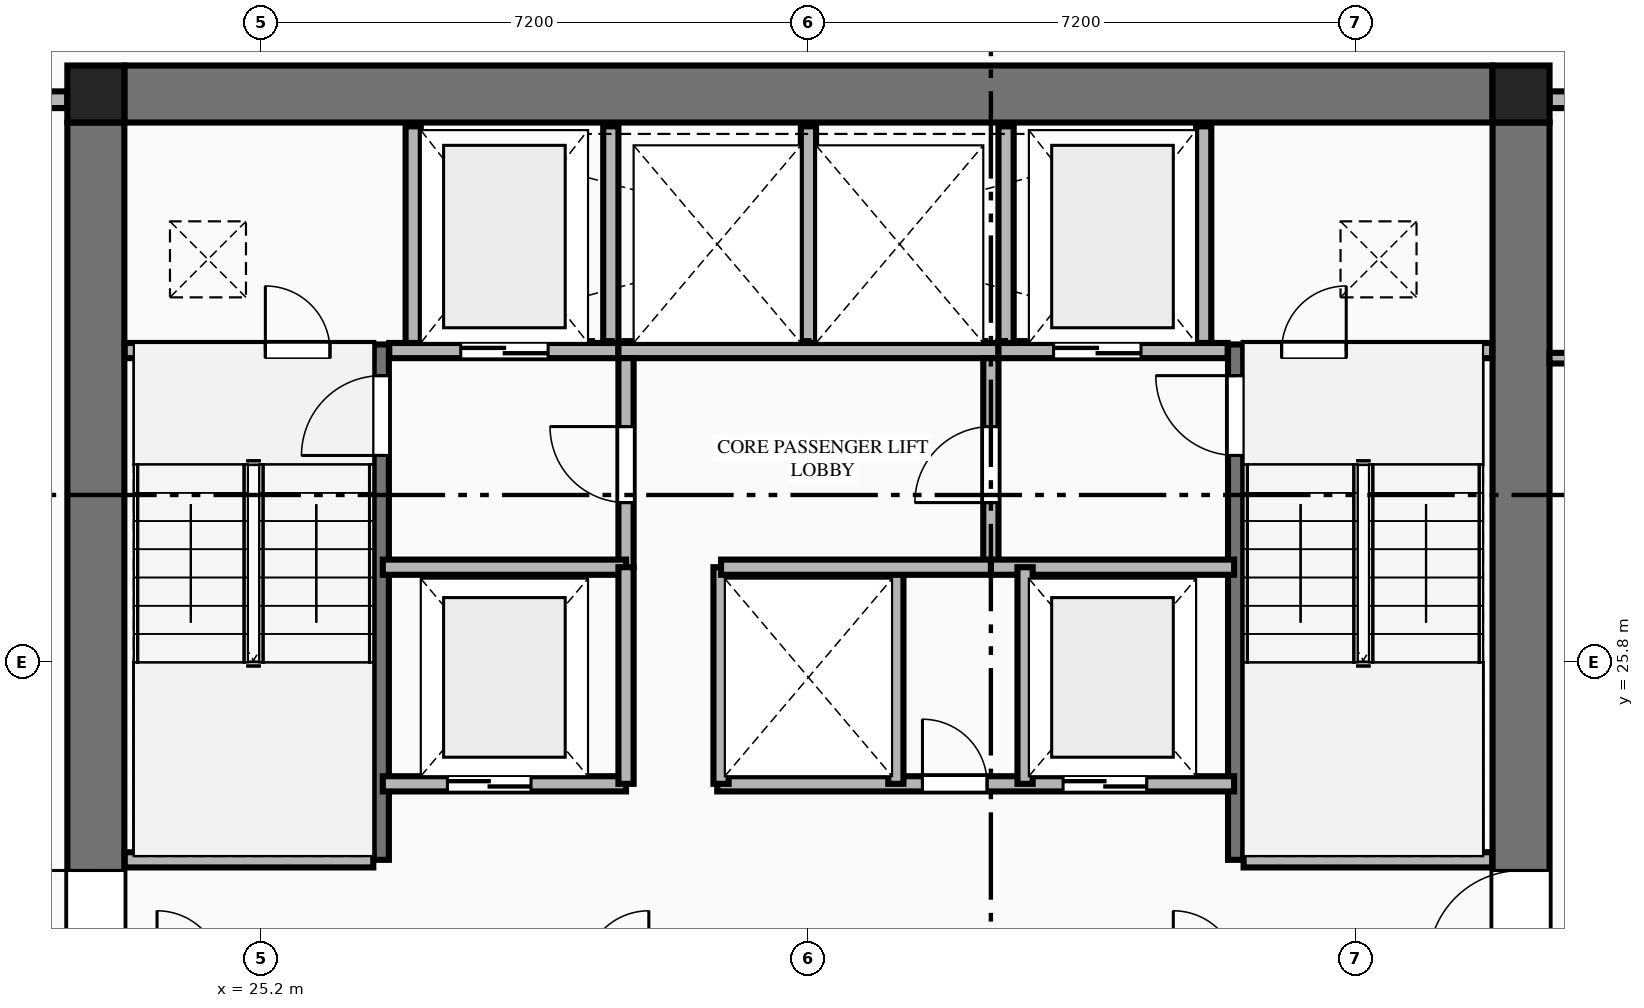
"""IFC4 building model, lengths in metres.
Left out: names, types, materials, properties, quantities, classifications, styles, units other than length and angle.
Written with IfcOpenShell. Run it as: python <this file> out.ifc"""

import sys

from ifc_helpers import new_model, si_unit, direction, frame, frame_2d, origin, origin_2d, place, context, subcontext, project, spatial, rectangle, extrude, element, fill, save


model = new_model("IFC4")
c1 = context("Model", 3, precision=1e-05, world=origin(), true_north=direction((0.0, 1.0)))
c2 = subcontext(c1, "Body", "Model", "MODEL_VIEW")
j1 = project(units=[si_unit("LENGTHUNIT", "METRE"), si_unit("PLANEANGLEUNIT", "RADIAN")], contexts=[c1])
p1 = place(None, origin())
s1 = spatial("IfcSite", under=j1, at=p1, CompositionType="ELEMENT")
p2 = place(p1, origin())
s2 = spatial("IfcBuilding", under=s1, at=p2, CompositionType="ELEMENT")
p3 = place(p2, frame((0.0, 0.0, 148.1)))
s3 = spatial("IfcBuildingStorey", under=s2, at=p3, CompositionType="ELEMENT", Elevation=148.1)
for number, where, z_axis, x_axis in (
    (1, (41.775, 33.275, 0.0), (0.0, 0.0, 1.0), (1.0, 0.0, 0.0)),
    (2, (23.025, 33.275, 0.0), (0.0, 0.0, 1.0), (1.0, 0.0, 0.0)),
):
    element("IfcColumn", number, at=place(p3, frame(where, z_axis=z_axis, x_axis=x_axis)), inside=s3, PredefinedType="COLUMN", context=c2, shape_type="SweptSolid", body=[
        extrude(rectangle(XDim=0.75, YDim=0.75, at=origin_2d()), origin(), (0.0, 0.0, 1.0), 5.4),
    ])
p4 = place(p3, frame((23.4, 33.275, 0.0), z_axis=(0.0, 0.0, 1.0), x_axis=(1.0, 0.0, 0.0)))
e3 = element("IfcWall", 3, at=p4, inside=s3, PredefinedType="SHEAR", context=c2, shape_type="SweptSolid", body=[
    extrude(rectangle(XDim=18.0, YDim=0.75, at=frame_2d((9.0, 0.0))), origin(), (0.0, 0.0, 1.0), 5.19),
])
p5 = place(p3, frame((23.025, 18.9, 0.0), z_axis=(0.0, 0.0, 1.0), x_axis=(0.0, 1.0, 0.0)))
e4 = element("IfcWall", 4, at=p5, inside=s3, PredefinedType="SHEAR", context=c2, shape_type="SweptSolid", body=[
    extrude(rectangle(XDim=14.0, YDim=0.75, at=frame_2d((7.0, 0.0))), origin(), (0.0, 0.0, 1.0), 5.19),
])
p6 = place(p5, frame((2.94, 0.0, 0.0)))
e5 = element("IfcOpeningElement", 5, at=p6, cuts=e4, PredefinedType="OPENING", context=c2, shape_type="SweptSolid", body=[
    extrude(rectangle(XDim=1.22, YDim=2.25, at=frame_2d((0.61, 1.125))), frame((0.0, 0.385, 0.0), z_axis=(0.0, -1.0, 0.0), x_axis=(1.0, 0.0, 0.0)), (0.0, 0.0, 1.0), 0.77),
])
p7 = place(p3, frame((41.775, 18.9, 0.0), z_axis=(0.0, 0.0, 1.0), x_axis=(0.0, 1.0, 0.0)))
e6 = element("IfcWall", 6, at=p7, inside=s3, PredefinedType="SHEAR", context=c2, shape_type="SweptSolid", body=[
    extrude(rectangle(XDim=14.0, YDim=0.75, at=frame_2d((7.0, 0.0))), origin(), (0.0, 0.0, 1.0), 5.19),
])
p8 = place(p7, frame((2.94, 0.0, 0.0)))
e7 = element("IfcOpeningElement", 7, at=p8, cuts=e6, PredefinedType="OPENING", context=c2, shape_type="SweptSolid", body=[
    extrude(rectangle(XDim=1.22, YDim=2.25, at=frame_2d((0.61, 1.125))), frame((0.0, 0.385, 0.0), z_axis=(0.0, -1.0, 0.0), x_axis=(1.0, 0.0, 0.0)), (0.0, 0.0, 1.0), 0.77),
])
p9 = place(p3, frame((26.78, 23.2, 0.0), z_axis=(0.0, 0.0, 1.0), x_axis=(0.0, 1.0, 0.0)))
e8 = element("IfcWall", 8, at=p9, inside=s3, PredefinedType="SHEAR", context=c2, shape_type="SweptSolid", body=[
    extrude(rectangle(XDim=6.78, YDim=0.2, at=frame_2d((3.39, 0.0))), origin(), (0.0, 0.0, 1.0), 5.4),
])
p10 = place(p9, frame((5.32, 0.0, 0.0)))
e9 = element("IfcOpeningElement", 9, at=p10, cuts=e8, PredefinedType="OPENING", context=c2, shape_type="SweptSolid", body=[
    extrude(rectangle(XDim=1.05, YDim=2.15, at=frame_2d((0.525, 1.075))), frame((0.0, 0.11, 0.0), z_axis=(0.0, -1.0, 0.0), x_axis=(1.0, 0.0, 0.0)), (0.0, 0.0, 1.0), 0.22),
])
p11 = place(p3, frame((23.405, 23.2, 0.0), z_axis=(0.0, 0.0, 1.0), x_axis=(1.0, 0.0, 0.0)))
e10 = element("IfcWall", 10, at=p11, inside=s3, PredefinedType="PLUMBINGWALL", context=c2, shape_type="SweptSolid", body=[
    extrude(rectangle(XDim=3.27, YDim=0.2, at=frame_2d((1.635, 0.0))), origin(), (0.0, 0.0, 1.0), 5.19),
])
p12 = place(p3, frame((38.02, 23.2, 0.0), z_axis=(0.0, 0.0, 1.0), x_axis=(0.0, 1.0, 0.0)))
e11 = element("IfcWall", 11, at=p12, inside=s3, PredefinedType="SHEAR", context=c2, shape_type="SweptSolid", body=[
    extrude(rectangle(XDim=6.78, YDim=0.2, at=frame_2d((3.39, 0.0))), origin(), (0.0, 0.0, 1.0), 5.4),
])
p13 = place(p12, frame((5.32, 0.0, 0.0)))
e12 = element("IfcOpeningElement", 12, at=p13, cuts=e11, PredefinedType="OPENING", context=c2, shape_type="SweptSolid", body=[
    extrude(rectangle(XDim=1.05, YDim=2.15, at=frame_2d((0.525, 1.075))), frame((0.0, 0.11, 0.0), z_axis=(0.0, -1.0, 0.0), x_axis=(1.0, 0.0, 0.0)), (0.0, 0.0, 1.0), 0.22),
])
p14 = place(p3, frame((38.125, 23.2, 0.0), z_axis=(0.0, 0.0, 1.0), x_axis=(1.0, 0.0, 0.0)))
e13 = element("IfcWall", 13, at=p14, inside=s3, PredefinedType="PLUMBINGWALL", context=c2, shape_type="SweptSolid", body=[
    extrude(rectangle(XDim=3.27, YDim=0.2, at=frame_2d((1.635, 0.0))), origin(), (0.0, 0.0, 1.0), 5.19),
])
p15 = place(p3, frame((23.405, 29.9, 0.0), z_axis=(0.0, 0.0, 1.0), x_axis=(1.0, 0.0, 0.0)))
e14 = element("IfcWall", 14, at=p15, inside=s3, PredefinedType="PLUMBINGWALL", context=c2, shape_type="SweptSolid", body=[
    extrude(rectangle(XDim=3.27, YDim=0.2, at=frame_2d((1.635, 0.0))), origin(), (0.0, 0.0, 1.0), 5.19),
])
p16 = place(p15, frame((1.85, 0.0, 0.0)))
e15 = element("IfcOpeningElement", 15, at=p16, cuts=e14, PredefinedType="OPENING", context=c2, shape_type="SweptSolid", body=[
    extrude(rectangle(XDim=0.85, YDim=2.05, at=frame_2d((0.425, 1.025))), frame((0.0, 0.11, 0.0), z_axis=(0.0, -1.0, 0.0), x_axis=(1.0, 0.0, 0.0)), (0.0, 0.0, 1.0), 0.22),
])
p17 = place(p3, frame((26.885, 29.9, 0.0), z_axis=(0.0, 0.0, 1.0), x_axis=(1.0, 0.0, 0.0)))
e16 = element("IfcWall", 16, at=p17, inside=s3, PredefinedType="PLUMBINGWALL", context=c2, shape_type="SweptSolid", body=[
    extrude(rectangle(XDim=3.015, YDim=0.2, at=frame_2d((1.507, 0.0))), origin(), (0.0, 0.0, 1.0), 5.19),
])
p18 = place(p17, frame((0.94, 0.0, 0.0)))
e17 = element("IfcOpeningElement", 17, at=p18, cuts=e16, PredefinedType="OPENING", context=c2, shape_type="SweptSolid", body=[
    extrude(rectangle(XDim=1.15, YDim=2.2, at=frame_2d((0.575, 1.1))), frame((0.0, 0.11, 0.0), z_axis=(0.0, -1.0, 0.0), x_axis=(1.0, 0.0, 0.0)), (0.0, 0.0, 1.0), 0.22),
])
p19 = place(p3, frame((29.9, 29.9, 0.0), z_axis=(0.0, 0.0, 1.0), x_axis=(1.0, 0.0, 0.0)))
e18 = element("IfcWall", 18, at=p19, inside=s3, PredefinedType="PLUMBINGWALL", context=c2, shape_type="SweptSolid", body=[
    extrude(rectangle(XDim=5.0, YDim=0.2, at=frame_2d((2.5, 0.0))), origin(), (0.0, 0.0, 1.0), 5.19),
])
p20 = place(p3, frame((34.9, 29.9, 0.0), z_axis=(0.0, 0.0, 1.0), x_axis=(1.0, 0.0, 0.0)))
e19 = element("IfcWall", 19, at=p20, inside=s3, PredefinedType="PLUMBINGWALL", context=c2, shape_type="SweptSolid", body=[
    extrude(rectangle(XDim=3.015, YDim=0.2, at=frame_2d((1.508, 0.0))), origin(), (0.0, 0.0, 1.0), 5.19),
])
p21 = place(p20, frame((0.725, 0.0, 0.0)))
e20 = element("IfcOpeningElement", 20, at=p21, cuts=e19, PredefinedType="OPENING", context=c2, shape_type="SweptSolid", body=[
    extrude(rectangle(XDim=1.15, YDim=2.2, at=frame_2d((0.575, 1.1))), frame((0.0, 0.11, 0.0), z_axis=(0.0, -1.0, 0.0), x_axis=(1.0, 0.0, 0.0)), (0.0, 0.0, 1.0), 0.22),
])
p22 = place(p3, frame((38.125, 29.9, 0.0), z_axis=(0.0, 0.0, 1.0), x_axis=(1.0, 0.0, 0.0)))
e21 = element("IfcWall", 21, at=p22, inside=s3, PredefinedType="PLUMBINGWALL", context=c2, shape_type="SweptSolid", body=[
    extrude(rectangle(XDim=3.27, YDim=0.2, at=frame_2d((1.635, 0.0))), origin(), (0.0, 0.0, 1.0), 5.19),
])
p23 = place(p22, frame((0.5, 0.0, 0.0)))
e22 = element("IfcOpeningElement", 22, at=p23, cuts=e21, PredefinedType="OPENING", context=c2, shape_type="SweptSolid", body=[
    extrude(rectangle(XDim=0.85, YDim=2.05, at=frame_2d((0.425, 1.025))), frame((0.0, 0.11, 0.0), z_axis=(0.0, -1.0, 0.0), x_axis=(1.0, 0.0, 0.0)), (0.0, 0.0, 1.0), 0.22),
])
for number, where, z_axis, x_axis in (
    (23, (27.2, 30.0, 0.0), (0.0, 0.0, 1.0), (0.0, 1.0, 0.0)),
    (24, (29.8, 30.0, 0.0), (0.0, 0.0, 1.0), (0.0, 1.0, 0.0)),
    (25, (32.4, 30.0, 0.0), (0.0, 0.0, 1.0), (0.0, 1.0, 0.0)),
    (26, (35.0, 30.0, 0.0), (0.0, 0.0, 1.0), (0.0, 1.0, 0.0)),
    (27, (37.6, 30.0, 0.0), (0.0, 0.0, 1.0), (0.0, 1.0, 0.0)),
):
    element("IfcWall", number, at=place(p3, frame(where, z_axis=z_axis, x_axis=x_axis)), inside=s3, PredefinedType="PLUMBINGWALL", context=c2, shape_type="SweptSolid", body=[
        extrude(rectangle(XDim=2.85, YDim=0.2, at=frame_2d((1.425, 0.0))), origin(), (0.0, 0.0, 1.0), 5.19),
    ])
p24 = place(p3, frame((30.0, 27.05, 0.0), z_axis=(0.0, 0.0, 1.0), x_axis=(0.0, 1.0, 0.0)))
e28 = element("IfcWall", 28, at=p24, inside=s3, PredefinedType="PLUMBINGWALL", context=c2, shape_type="SweptSolid", body=[
    extrude(rectangle(XDim=2.75, YDim=0.2, at=frame_2d((1.375, 0.0))), origin(), (0.0, 0.0, 1.0), 5.19),
])
p25 = place(p24, frame((0.85, 0.0, 0.0)))
e29 = element("IfcOpeningElement", 29, at=p25, cuts=e28, PredefinedType="OPENING", context=c2, shape_type="SweptSolid", body=[
    extrude(rectangle(XDim=1.0, YDim=2.15, at=frame_2d((0.5, 1.075))), frame((0.0, 0.11, 0.0), z_axis=(0.0, -1.0, 0.0), x_axis=(1.0, 0.0, 0.0)), (0.0, 0.0, 1.0), 0.22),
])
p26 = place(p3, frame((26.8, 27.05, 0.0), z_axis=(0.0, 0.0, 1.0), x_axis=(1.0, 0.0, 0.0)))
e30 = element("IfcWall", 30, at=p26, inside=s3, PredefinedType="PLUMBINGWALL", context=c2, shape_type="SweptSolid", body=[
    extrude(rectangle(XDim=3.2, YDim=0.2, at=frame_2d((1.6, 0.0))), origin(), (0.0, 0.0, 1.0), 5.19),
])
p27 = place(p3, frame((34.8, 27.05, 0.0), z_axis=(0.0, 0.0, 1.0), x_axis=(0.0, 1.0, 0.0)))
e31 = element("IfcWall", 31, at=p27, inside=s3, PredefinedType="PLUMBINGWALL", context=c2, shape_type="SweptSolid", body=[
    extrude(rectangle(XDim=2.75, YDim=0.2, at=frame_2d((1.375, 0.0))), origin(), (0.0, 0.0, 1.0), 5.19),
])
p28 = place(p27, frame((0.85, 0.0, 0.0)))
e32 = element("IfcOpeningElement", 32, at=p28, cuts=e31, PredefinedType="OPENING", context=c2, shape_type="SweptSolid", body=[
    extrude(rectangle(XDim=1.0, YDim=2.15, at=frame_2d((0.5, 1.075))), frame((0.0, 0.11, 0.0), z_axis=(0.0, -1.0, 0.0), x_axis=(1.0, 0.0, 0.0)), (0.0, 0.0, 1.0), 0.22),
])
p29 = place(p3, frame((34.8, 27.05, 0.0), z_axis=(0.0, 0.0, 1.0), x_axis=(1.0, 0.0, 0.0)))
e33 = element("IfcWall", 33, at=p29, inside=s3, PredefinedType="PLUMBINGWALL", context=c2, shape_type="SweptSolid", body=[
    extrude(rectangle(XDim=3.2, YDim=0.2, at=frame_2d((1.6, 0.0))), origin(), (0.0, 0.0, 1.0), 5.19),
])
p30 = place(p3, frame((26.8, 24.2, 0.0), z_axis=(0.0, 0.0, 1.0), x_axis=(1.0, 0.0, 0.0)))
e34 = element("IfcWall", 34, at=p30, inside=s3, PredefinedType="PLUMBINGWALL", context=c2, shape_type="SweptSolid", body=[
    extrude(rectangle(XDim=3.2, YDim=0.2, at=frame_2d((1.6, 0.0))), origin(), (0.0, 0.0, 1.0), 5.19),
])
p31 = place(p30, frame((0.85, 0.0, 0.0)))
e35 = element("IfcOpeningElement", 35, at=p31, cuts=e34, PredefinedType="OPENING", context=c2, shape_type="SweptSolid", body=[
    extrude(rectangle(XDim=1.1, YDim=2.2, at=frame_2d((0.55, 1.1))), frame((0.0, 0.11, 0.0), z_axis=(0.0, -1.0, 0.0), x_axis=(1.0, 0.0, 0.0)), (0.0, 0.0, 1.0), 0.22),
])
p32 = place(p3, frame((30.0, 24.2, 0.0), z_axis=(0.0, 0.0, 1.0), x_axis=(0.0, 1.0, 0.0)))
e36 = element("IfcWall", 36, at=p32, inside=s3, PredefinedType="PLUMBINGWALL", context=c2, shape_type="SweptSolid", body=[
    extrude(rectangle(XDim=2.85, YDim=0.2, at=frame_2d((1.425, 0.0))), origin(), (0.0, 0.0, 1.0), 5.19),
])
p33 = place(p3, frame((31.2, 24.2, 0.0), z_axis=(0.0, 0.0, 1.0), x_axis=(1.0, 0.0, 0.0)))
e37 = element("IfcWall", 37, at=p33, inside=s3, PredefinedType="PLUMBINGWALL", context=c2, shape_type="SweptSolid", body=[
    extrude(rectangle(XDim=6.8, YDim=0.2, at=frame_2d((3.4, 0.0))), origin(), (0.0, 0.0, 1.0), 5.19),
])
p34 = place(p33, frame((2.7, 0.0, 0.0)))
e38 = element("IfcOpeningElement", 38, at=p34, cuts=e37, PredefinedType="OPENING", context=c2, shape_type="SweptSolid", body=[
    extrude(rectangle(XDim=0.85, YDim=2.05, at=frame_2d((0.425, 1.025))), frame((0.0, 0.11, 0.0), z_axis=(0.0, -1.0, 0.0), x_axis=(1.0, 0.0, 0.0)), (0.0, 0.0, 1.0), 0.22),
])
p35 = place(p33, frame((4.55, 0.0, 0.0)))
e39 = element("IfcOpeningElement", 39, at=p35, cuts=e37, PredefinedType="OPENING", context=c2, shape_type="SweptSolid", body=[
    extrude(rectangle(XDim=1.1, YDim=2.2, at=frame_2d((0.55, 1.1))), frame((0.0, 0.11, 0.0), z_axis=(0.0, -1.0, 0.0), x_axis=(1.0, 0.0, 0.0)), (0.0, 0.0, 1.0), 0.22),
])
for number, where, z_axis, x_axis in (
    (40, (31.25, 24.2, 0.0), (0.0, 0.0, 1.0), (0.0, 1.0, 0.0)),
    (41, (33.55, 24.2, 0.0), (0.0, 0.0, 1.0), (0.0, 1.0, 0.0)),
    (42, (35.25, 24.2, 0.0), (0.0, 0.0, 1.0), (0.0, 1.0, 0.0)),
):
    element("IfcWall", number, at=place(p3, frame(where, z_axis=z_axis, x_axis=x_axis)), inside=s3, PredefinedType="PLUMBINGWALL", context=c2, shape_type="SweptSolid", body=[
        extrude(rectangle(XDim=2.85, YDim=0.2, at=frame_2d((1.425, 0.0))), origin(), (0.0, 0.0, 1.0), 5.19),
    ])
p36 = place(p3, frame((31.25, 27.05, 0.0), z_axis=(0.0, 0.0, 1.0), x_axis=(1.0, 0.0, 0.0)))
e43 = element("IfcWall", 43, at=p36, inside=s3, PredefinedType="PLUMBINGWALL", context=c2, shape_type="SweptSolid", body=[
    extrude(rectangle(XDim=3.55, YDim=0.2, at=frame_2d((1.775, 0.0))), origin(), (0.0, 0.0, 1.0), 5.19),
])
p37 = place(p3, frame((13.487, 33.2, 0.0), z_axis=(0.0, 0.0, 1.0), x_axis=(1.0, 0.0, 0.0)))
e44 = element("IfcWall", 44, at=p37, inside=s3, PredefinedType="PARTITIONING", context=c2, shape_type="SweptSolid", body=[
    extrude(rectangle(XDim=9.163, YDim=0.22, at=frame_2d((4.582, 0.0))), origin(), (0.0, 0.0, 1.0), 4.572),
])
p38 = place(p37, frame((7.513, 0.0, 0.0)))
e45 = element("IfcOpeningElement", 45, at=p38, cuts=e44, PredefinedType="OPENING", context=c2, shape_type="SweptSolid", body=[
    extrude(rectangle(XDim=1.0, YDim=2.15, at=frame_2d((0.5, 1.075))), frame((0.0, 0.12, 0.0), z_axis=(0.0, -1.0, 0.0), x_axis=(1.0, 0.0, 0.0)), (0.0, 0.0, 1.0), 0.24),
])
p39 = place(p3, frame((42.15, 33.2, 0.0), z_axis=(0.0, 0.0, 1.0), x_axis=(1.0, 0.0, 0.0)))
e46 = element("IfcWall", 46, at=p39, inside=s3, PredefinedType="PARTITIONING", context=c2, shape_type="SweptSolid", body=[
    extrude(rectangle(XDim=9.163, YDim=0.22, at=frame_2d((4.582, 0.0))), origin(), (0.0, 0.0, 1.0), 4.572),
])
p40 = place(p39, frame((3.55, 0.0, 0.0)))
e47 = element("IfcOpeningElement", 47, at=p40, cuts=e46, PredefinedType="OPENING", context=c2, shape_type="SweptSolid", body=[
    extrude(rectangle(XDim=1.0, YDim=2.15, at=frame_2d((0.5, 1.075))), frame((0.0, 0.12, 0.0), z_axis=(0.0, -1.0, 0.0), x_axis=(1.0, 0.0, 0.0)), (0.0, 0.0, 1.0), 0.24),
])
p41 = place(p3, frame((42.15, 29.8, 0.0), z_axis=(0.0, 0.0, 1.0), x_axis=(1.0, 0.0, 0.0)))
e48 = element("IfcWall", 48, at=p41, inside=s3, PredefinedType="PLUMBINGWALL", context=c2, shape_type="SweptSolid", body=[
    extrude(rectangle(XDim=3.2, YDim=0.14, at=frame_2d((1.6, 0.0))), origin(), (0.0, 0.0, 1.0), 5.19),
])
p42 = place(p41, frame((0.8, 0.0, 0.0)))
e49 = element("IfcOpeningElement", 49, at=p42, cuts=e48, PredefinedType="OPENING", context=c2, shape_type="SweptSolid", body=[
    extrude(rectangle(XDim=0.96, YDim=2.15, at=frame_2d((0.48, 1.075))), frame((0.0, 0.08, 0.0), z_axis=(0.0, -1.0, 0.0), x_axis=(1.0, 0.0, 0.0)), (0.0, 0.0, 1.0), 0.16),
])
p43 = place(p6, origin())
e50 = element("IfcDoor", 50, at=p43, inside=s3, OperationType="SINGLE_SWING_RIGHT", PredefinedType="DOOR", context=c2, shape_type="SweptSolid", body=[
    extrude(rectangle(XDim=1.22, YDim=2.25, at=frame_2d((0.61, 1.125))), frame((0.0, 0.025, 0.0), z_axis=(0.0, -1.0, 0.0), x_axis=(1.0, 0.0, 0.0)), (0.0, 0.0, 1.0), 0.05),
])
fill(e5, e50)
p44 = place(p8, origin())
e51 = element("IfcDoor", 51, at=p44, inside=s3, OperationType="SINGLE_SWING_LEFT", PredefinedType="DOOR", context=c2, shape_type="SweptSolid", body=[
    extrude(rectangle(XDim=1.22, YDim=2.25, at=frame_2d((0.61, 1.125))), frame((0.0, 0.025, 0.0), z_axis=(0.0, -1.0, 0.0), x_axis=(1.0, 0.0, 0.0)), (0.0, 0.0, 1.0), 0.05),
])
fill(e7, e51)
p45 = place(p10, origin())
e52 = element("IfcDoor", 52, at=p45, inside=s3, OperationType="SINGLE_SWING_LEFT", PredefinedType="DOOR", context=c2, shape_type="SweptSolid", body=[
    extrude(rectangle(XDim=1.05, YDim=2.15, at=frame_2d((0.525, 1.075))), frame((0.0, 0.025, 0.0), z_axis=(0.0, -1.0, 0.0), x_axis=(1.0, 0.0, 0.0)), (0.0, 0.0, 1.0), 0.05),
])
fill(e9, e52)
p46 = place(p13, origin())
e53 = element("IfcDoor", 53, at=p46, inside=s3, OperationType="SINGLE_SWING_RIGHT", PredefinedType="DOOR", context=c2, shape_type="SweptSolid", body=[
    extrude(rectangle(XDim=1.05, YDim=2.15, at=frame_2d((0.525, 1.075))), frame((0.0, 0.025, 0.0), z_axis=(0.0, -1.0, 0.0), x_axis=(1.0, 0.0, 0.0)), (0.0, 0.0, 1.0), 0.05),
])
fill(e12, e53)
p47 = place(p16, origin())
e54 = element("IfcDoor", 54, at=p47, inside=s3, OperationType="SINGLE_SWING_LEFT", PredefinedType="DOOR", context=c2, shape_type="SweptSolid", body=[
    extrude(rectangle(XDim=0.85, YDim=2.05, at=frame_2d((0.425, 1.025))), frame((0.0, 0.025, 0.0), z_axis=(0.0, -1.0, 0.0), x_axis=(1.0, 0.0, 0.0)), (0.0, 0.0, 1.0), 0.05),
])
fill(e15, e54)
p48 = place(p23, origin())
e55 = element("IfcDoor", 55, at=p48, inside=s3, OperationType="SINGLE_SWING_RIGHT", PredefinedType="DOOR", context=c2, shape_type="SweptSolid", body=[
    extrude(rectangle(XDim=0.85, YDim=2.05, at=frame_2d((0.425, 1.025))), frame((0.0, 0.025, 0.0), z_axis=(0.0, -1.0, 0.0), x_axis=(1.0, 0.0, 0.0)), (0.0, 0.0, 1.0), 0.05),
])
fill(e22, e55)
p49 = place(p18, origin())
e56 = element("IfcDoor", 56, at=p49, inside=s3, OperationType="DOUBLE_DOOR_SLIDING", PredefinedType="DOOR", context=c2, shape_type="SweptSolid", body=[
    extrude(rectangle(XDim=1.15, YDim=2.2, at=frame_2d((0.575, 1.1))), frame((0.0, 0.025, 0.0), z_axis=(0.0, -1.0, 0.0), x_axis=(1.0, 0.0, 0.0)), (0.0, 0.0, 1.0), 0.05),
])
fill(e17, e56)
p50 = place(p21, origin())
e57 = element("IfcDoor", 57, at=p50, inside=s3, OperationType="DOUBLE_DOOR_SLIDING", PredefinedType="DOOR", context=c2, shape_type="SweptSolid", body=[
    extrude(rectangle(XDim=1.15, YDim=2.2, at=frame_2d((0.575, 1.1))), frame((0.0, 0.025, 0.0), z_axis=(0.0, -1.0, 0.0), x_axis=(1.0, 0.0, 0.0)), (0.0, 0.0, 1.0), 0.05),
])
fill(e20, e57)
p51 = place(p25, origin())
e58 = element("IfcDoor", 58, at=p51, inside=s3, OperationType="SINGLE_SWING_RIGHT", PredefinedType="DOOR", context=c2, shape_type="SweptSolid", body=[
    extrude(rectangle(XDim=1.0, YDim=2.15, at=frame_2d((0.5, 1.075))), frame((0.0, 0.025, 0.0), z_axis=(0.0, -1.0, 0.0), x_axis=(1.0, 0.0, 0.0)), (0.0, 0.0, 1.0), 0.05),
])
fill(e29, e58)
p52 = place(p28, origin())
e59 = element("IfcDoor", 59, at=p52, inside=s3, OperationType="SINGLE_SWING_LEFT", PredefinedType="DOOR", context=c2, shape_type="SweptSolid", body=[
    extrude(rectangle(XDim=1.0, YDim=2.15, at=frame_2d((0.5, 1.075))), frame((0.0, 0.025, 0.0), z_axis=(0.0, -1.0, 0.0), x_axis=(1.0, 0.0, 0.0)), (0.0, 0.0, 1.0), 0.05),
])
fill(e32, e59)
p53 = place(p31, origin())
e60 = element("IfcDoor", 60, at=p53, inside=s3, OperationType="DOUBLE_DOOR_SLIDING", PredefinedType="DOOR", context=c2, shape_type="SweptSolid", body=[
    extrude(rectangle(XDim=1.1, YDim=2.2, at=frame_2d((0.55, 1.1))), frame((0.0, 0.025, 0.0), z_axis=(0.0, -1.0, 0.0), x_axis=(1.0, 0.0, 0.0)), (0.0, 0.0, 1.0), 0.05),
])
fill(e35, e60)
p54 = place(p34, origin())
e61 = element("IfcDoor", 61, at=p54, inside=s3, OperationType="SINGLE_SWING_LEFT", PredefinedType="DOOR", context=c2, shape_type="SweptSolid", body=[
    extrude(rectangle(XDim=0.85, YDim=2.05, at=frame_2d((0.425, 1.025))), frame((0.0, 0.025, 0.0), z_axis=(0.0, -1.0, 0.0), x_axis=(1.0, 0.0, 0.0)), (0.0, 0.0, 1.0), 0.05),
])
fill(e38, e61)
p55 = place(p35, origin())
e62 = element("IfcDoor", 62, at=p55, inside=s3, OperationType="DOUBLE_DOOR_SLIDING", PredefinedType="DOOR", context=c2, shape_type="SweptSolid", body=[
    extrude(rectangle(XDim=1.1, YDim=2.2, at=frame_2d((0.55, 1.1))), frame((0.0, 0.025, 0.0), z_axis=(0.0, -1.0, 0.0), x_axis=(1.0, 0.0, 0.0)), (0.0, 0.0, 1.0), 0.05),
])
fill(e39, e62)
save(model, sys.argv[1])
